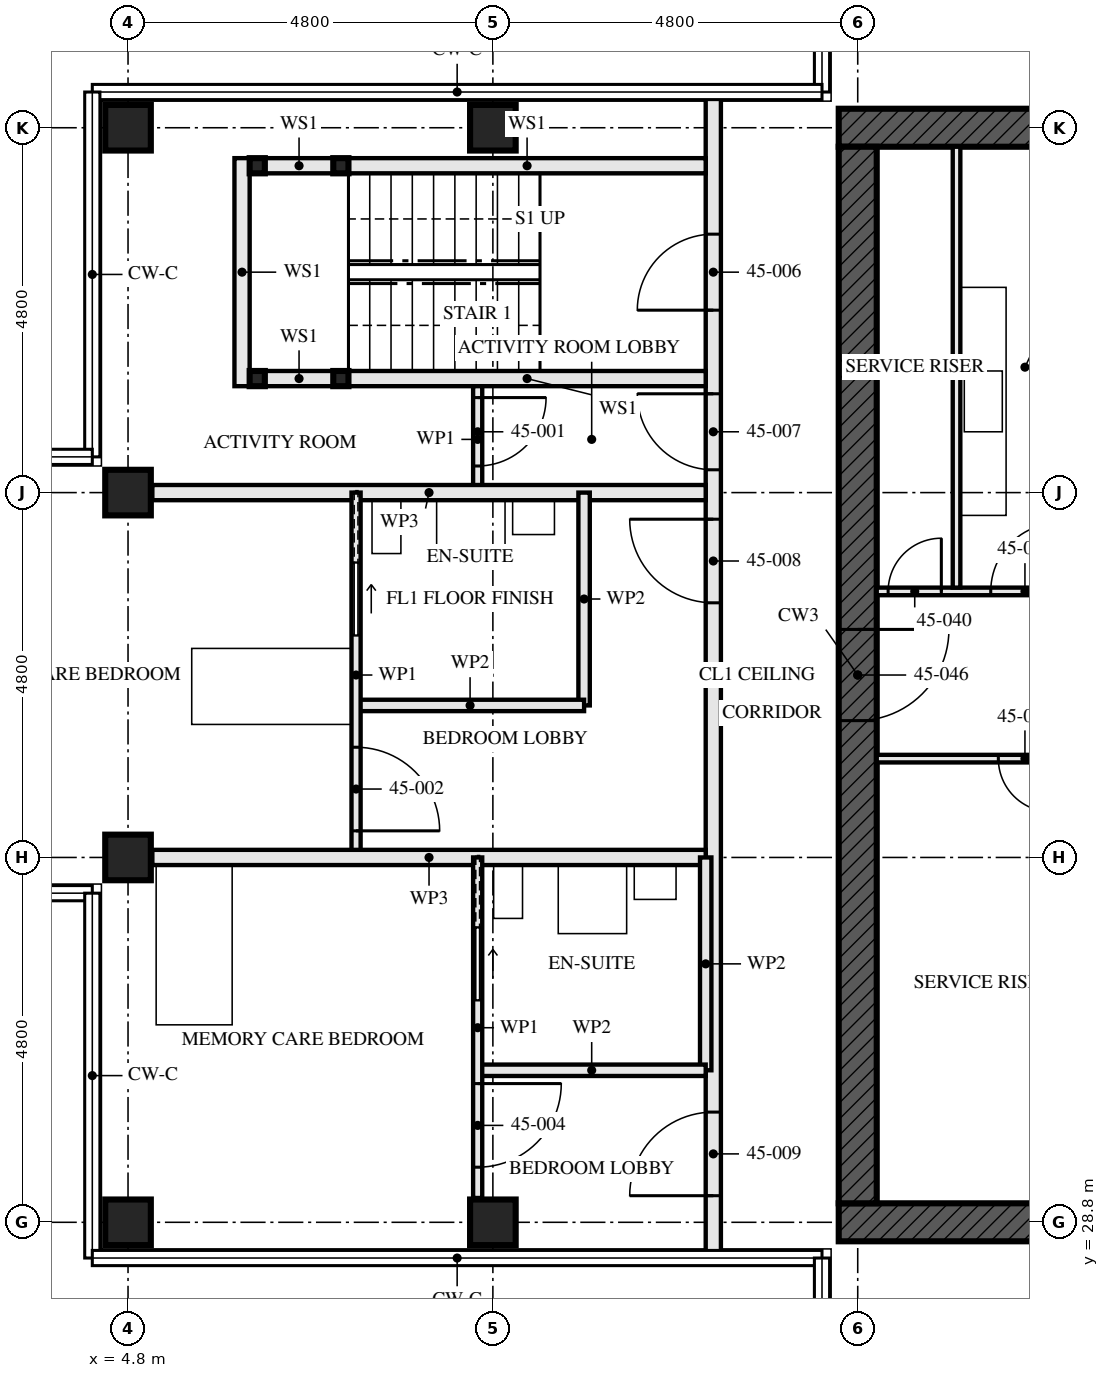
"""IFC4 building model, lengths in metres.
Left out: names, types, materials, properties, quantities, classifications, styles, units other than length and angle.
Written with IfcOpenShell. Run it as: python <this file> out.ifc"""

import sys

from ifc_helpers import new_model, si_unit, direction, frame, frame_2d, origin, origin_2d, place, context, subcontext, project, spatial, rectangle, hollow_rectangle, extrude, element, fill, save


model = new_model("IFC4")
c1 = context("Model", 3, precision=1e-05, world=origin(), true_north=direction((0.0, 1.0)))
c2 = subcontext(c1, "Body", "Model", "MODEL_VIEW")
j1 = project(units=[si_unit("LENGTHUNIT", "METRE"), si_unit("PLANEANGLEUNIT", "RADIAN")], contexts=[c1])
p1 = place(None, origin())
s1 = spatial("IfcSite", under=j1, at=p1, CompositionType="ELEMENT")
p2 = place(p1, origin())
s2 = spatial("IfcBuilding", under=s1, at=p2, CompositionType="ELEMENT")
p3 = place(p2, frame((0.0, 0.0, 165.5)))
s3 = spatial("IfcBuildingStorey", under=s2, at=p3, CompositionType="ELEMENT", Elevation=165.5)
for number, where, z_axis, x_axis in (
    (1, (4.8, 28.8, 0.0), (0.0, 0.0, 1.0), (0.0, 1.0, 0.0)),
    (2, (4.8, 33.6, 0.0), (0.0, 0.0, 1.0), (0.0, 1.0, 0.0)),
    (3, (4.8, 38.4, 0.0), (0.0, 0.0, 1.0), (0.0, 1.0, 0.0)),
    (4, (4.8, 43.2, 0.0), (0.0, 0.0, 1.0), (0.0, 1.0, 0.0)),
):
    element("IfcColumn", number, at=place(p3, frame(where, z_axis=z_axis, x_axis=x_axis)), inside=s3, PredefinedType="COLUMN", context=c2, shape_type="SweptSolid", body=[
        extrude(hollow_rectangle(XDim=0.6, YDim=0.6, WallThickness=0.06, at=origin_2d()), origin(), (0.0, 0.0, 1.0), 3.5),
    ])
for number, where, z_axis, x_axis in (
    (5, (9.6, 28.8, 0.0), (0.0, 0.0, 1.0), (0.0, 1.0, 0.0)),
    (6, (9.6, 43.2, 0.0), (0.0, 0.0, 1.0), (0.0, 1.0, 0.0)),
):
    element("IfcColumn", number, at=place(p3, frame(where, z_axis=z_axis, x_axis=x_axis)), inside=s3, PredefinedType="COLUMN", context=c2, shape_type="SweptSolid", body=[
        extrude(hollow_rectangle(XDim=0.6, YDim=0.6, WallThickness=0.08, at=origin_2d()), origin(), (0.0, 0.0, 1.0), 3.5),
    ])
p4 = place(p3, frame((14.15, 28.8, -0.17), z_axis=(0.0, 0.0, 1.0), x_axis=(1.0, 0.0, 0.0)))
e7 = element("IfcWall", 7, at=p4, inside=s3, PredefinedType="SHEAR", context=c2, shape_type="SweptSolid", body=[
    extrude(rectangle(XDim=14.9, YDim=0.5, at=frame_2d((7.45, 0.0))), origin(), (0.0, 0.0, 1.0), 3.5),
])
p5 = place(p4, frame((6.85, 0.0, 0.17)))
e8 = element("IfcOpeningElement", 8, at=p5, cuts=e7, PredefinedType="OPENING", context=c2, shape_type="SweptSolid", body=[
    extrude(rectangle(XDim=1.2, YDim=2.1, at=frame_2d((0.6, 1.05))), frame((0.0, 0.26, 0.0), z_axis=(0.0, -1.0, 0.0), x_axis=(1.0, 0.0, 0.0)), (0.0, 0.0, 1.0), 0.521),
])
p6 = place(p3, frame((29.05, 43.2, -0.17), z_axis=(0.0, 0.0, 1.0), x_axis=(-1.0, 0.0, 0.0)))
e9 = element("IfcWall", 9, at=p6, inside=s3, PredefinedType="SHEAR", context=c2, shape_type="SweptSolid", body=[
    extrude(rectangle(XDim=14.9, YDim=0.5, at=frame_2d((7.45, 0.0))), origin(), (0.0, 0.0, 1.0), 3.5),
])
p7 = place(p6, frame((6.85, 0.0, 0.17)))
e10 = element("IfcOpeningElement", 10, at=p7, cuts=e9, PredefinedType="OPENING", context=c2, shape_type="SweptSolid", body=[
    extrude(rectangle(XDim=1.2, YDim=2.1, at=frame_2d((0.6, 1.05))), frame((0.0, 0.26, 0.0), z_axis=(0.0, -1.0, 0.0), x_axis=(1.0, 0.0, 0.0)), (0.0, 0.0, 1.0), 0.521),
])
p8 = place(p3, frame((14.4, 42.95, -0.17), z_axis=(0.0, 0.0, 1.0), x_axis=(0.0, -1.0, 0.0)))
e11 = element("IfcWall", 11, at=p8, inside=s3, PredefinedType="SHEAR", context=c2, shape_type="SweptSolid", body=[
    extrude(rectangle(XDim=13.9, YDim=0.5, at=frame_2d((6.95, 0.0))), origin(), (0.0, 0.0, 1.0), 3.5),
])
p9 = place(p8, frame((6.35, 0.0, 0.17)))
e12 = element("IfcOpeningElement", 12, at=p9, cuts=e11, PredefinedType="OPENING", context=c2, shape_type="SweptSolid", body=[
    extrude(rectangle(XDim=1.2, YDim=2.1, at=frame_2d((0.6, 1.05))), frame((0.0, 0.26, 0.0), z_axis=(0.0, -1.0, 0.0), x_axis=(1.0, 0.0, 0.0)), (0.0, 0.0, 1.0), 0.521),
])
for number, where, z_axis, x_axis in (
    (13, (6.5, 42.7, 0.0), (0.0, 0.0, 1.0), (1.0, 0.0, 0.0)),
    (14, (6.5, 39.9, 0.0), (0.0, 0.0, 1.0), (1.0, 0.0, 0.0)),
    (15, (7.6, 42.7, 0.0), (0.0, 0.0, 1.0), (1.0, 0.0, 0.0)),
    (16, (7.6, 39.9, 0.0), (0.0, 0.0, 1.0), (1.0, 0.0, 0.0)),
):
    element("IfcColumn", number, at=place(p3, frame(where, z_axis=z_axis, x_axis=x_axis)), inside=s3, PredefinedType="COLUMN", context=c2, shape_type="SweptSolid", body=[
        extrude(hollow_rectangle(XDim=0.2, YDim=0.2, WallThickness=0.008, at=origin_2d()), origin(), (0.0, 0.0, 1.0), 3.33),
    ])
p10 = place(p3, frame((6.6, 42.7, 0.0), z_axis=(0.0, 0.0, 1.0), x_axis=(1.0, 0.0, 0.0)))
e17 = element("IfcWall", 17, at=p10, inside=s3, PredefinedType="SOLIDWALL", context=c2, shape_type="SweptSolid", body=[
    extrude(rectangle(XDim=0.9, YDim=0.2, at=frame_2d((0.45, 0.0))), origin(), (0.0, 0.0, 1.0), 2.99),
])
p11 = place(p3, frame((7.7, 42.7, 0.0), z_axis=(0.0, 0.0, 1.0), x_axis=(1.0, 0.0, 0.0)))
e18 = element("IfcWall", 18, at=p11, inside=s3, PredefinedType="SOLIDWALL", context=c2, shape_type="SweptSolid", body=[
    extrude(rectangle(XDim=4.7, YDim=0.2, at=frame_2d((2.35, 0.0))), origin(), (0.0, 0.0, 1.0), 2.99),
])
p12 = place(p3, frame((6.6, 39.9, 0.0), z_axis=(0.0, 0.0, 1.0), x_axis=(1.0, 0.0, 0.0)))
e19 = element("IfcWall", 19, at=p12, inside=s3, PredefinedType="SOLIDWALL", context=c2, shape_type="SweptSolid", body=[
    extrude(rectangle(XDim=0.9, YDim=0.2, at=frame_2d((0.45, 0.0))), origin(), (0.0, 0.0, 1.0), 2.99),
])
p13 = place(p3, frame((7.7, 39.9, 0.0), z_axis=(0.0, 0.0, 1.0), x_axis=(1.0, 0.0, 0.0)))
e20 = element("IfcWall", 20, at=p13, inside=s3, PredefinedType="SOLIDWALL", context=c2, shape_type="SweptSolid", body=[
    extrude(rectangle(XDim=4.7, YDim=0.2, at=frame_2d((2.35, 0.0))), origin(), (0.0, 0.0, 1.0), 2.99),
])
p14 = place(p3, frame((6.3, 42.8, 0.0), z_axis=(0.0, 0.0, 1.0), x_axis=(0.0, -1.0, 0.0)))
e21 = element("IfcWall", 21, at=p14, inside=s3, PredefinedType="SOLIDWALL", context=c2, shape_type="SweptSolid", body=[
    extrude(rectangle(XDim=3.0, YDim=0.2, at=frame_2d((1.5, 0.0))), origin(), (0.0, 0.0, 1.0), 3.33),
])
p15 = place(p3, frame((9.4, 39.8, 0.0), z_axis=(0.0, 0.0, 1.0), x_axis=(0.0, -1.0, 0.0)))
e22 = element("IfcWall", 22, at=p15, inside=s3, PredefinedType="PARTITIONING", context=c2, shape_type="SweptSolid", body=[
    extrude(rectangle(XDim=1.4, YDim=0.12, at=frame_2d((0.7, 0.0))), origin(), (0.0, 0.0, 1.0), 3.33),
])
p16 = place(p15, frame((0.15, 0.0, 0.0)))
e23 = element("IfcOpeningElement", 23, at=p16, cuts=e22, PredefinedType="OPENING", context=c2, shape_type="SweptSolid", body=[
    extrude(rectangle(XDim=0.9, YDim=2.1, at=frame_2d((0.45, 1.05))), frame((0.0, 0.071, 0.0), z_axis=(0.0, -1.0, 0.0), x_axis=(1.0, 0.0, 0.0)), (0.0, 0.0, 1.0), 0.141),
])
p17 = place(p3, frame((5.12, 38.4, 0.0), z_axis=(0.0, 0.0, 1.0), x_axis=(1.0, 0.0, 0.0)))
e24 = element("IfcWall", 24, at=p17, inside=s3, PredefinedType="PARTITIONING", context=c2, shape_type="SweptSolid", body=[
    extrude(rectangle(XDim=7.28, YDim=0.2, at=frame_2d((3.64, 0.0))), origin(), (0.0, 0.0, 1.0), 2.55),
])
p18 = place(p3, frame((7.8, 35.6, 0.0), z_axis=(0.0, 0.0, 1.0), x_axis=(1.0, 0.0, 0.0)))
e25 = element("IfcWall", 25, at=p18, inside=s3, PredefinedType="PARTITIONING", context=c2, shape_type="SweptSolid", body=[
    extrude(rectangle(XDim=3.0, YDim=0.15, at=frame_2d((1.5, 0.0))), origin(), (0.0, 0.0, 1.0), 3.33),
])
p19 = place(p3, frame((10.8, 38.4, 0.0), z_axis=(0.0, 0.0, 1.0), x_axis=(0.0, -1.0, 0.0)))
e26 = element("IfcWall", 26, at=p19, inside=s3, PredefinedType="PARTITIONING", context=c2, shape_type="SweptSolid", body=[
    extrude(rectangle(XDim=2.8, YDim=0.15, at=frame_2d((1.4, 0.0))), origin(), (0.0, 0.0, 1.0), 3.33),
])
p20 = place(p3, frame((7.8, 38.4, 0.0), z_axis=(0.0, 0.0, 1.0), x_axis=(0.0, -1.0, 0.0)))
e27 = element("IfcWall", 27, at=p20, inside=s3, PredefinedType="PARTITIONING", context=c2, shape_type="SweptSolid", body=[
    extrude(rectangle(XDim=4.8, YDim=0.12, at=frame_2d((2.4, 0.0))), origin(), (0.0, 0.0, 1.0), 3.33),
])
p21 = place(p20, frame((3.35, 0.0, 0.0)))
e28 = element("IfcOpeningElement", 28, at=p21, cuts=e27, PredefinedType="OPENING", context=c2, shape_type="SweptSolid", body=[
    extrude(rectangle(XDim=1.1, YDim=2.1, at=frame_2d((0.55, 1.05))), frame((0.0, 0.071, 0.0), z_axis=(0.0, -1.0, 0.0), x_axis=(1.0, 0.0, 0.0)), (0.0, 0.0, 1.0), 0.141),
])
p22 = place(p20, frame((0.925, 0.0, 0.0)))
e29 = element("IfcOpeningElement", 29, at=p22, cuts=e27, PredefinedType="OPENING", context=c2, shape_type="SweptSolid", body=[
    extrude(rectangle(XDim=0.95, YDim=2.1, at=frame_2d((0.475, 1.05))), frame((0.0, 0.071, 0.0), z_axis=(0.0, -1.0, 0.0), x_axis=(1.0, 0.0, 0.0)), (0.0, 0.0, 1.0), 0.141),
])
p23 = place(p3, frame((5.12, 33.6, 0.0), z_axis=(0.0, 0.0, 1.0), x_axis=(1.0, 0.0, 0.0)))
e30 = element("IfcWall", 30, at=p23, inside=s3, PredefinedType="PARTITIONING", context=c2, shape_type="SweptSolid", body=[
    extrude(rectangle(XDim=7.28, YDim=0.2, at=frame_2d((3.64, 0.0))), origin(), (0.0, 0.0, 1.0), 2.55),
])
p24 = place(p3, frame((9.4, 30.8, 0.0), z_axis=(0.0, 0.0, 1.0), x_axis=(1.0, 0.0, 0.0)))
e31 = element("IfcWall", 31, at=p24, inside=s3, PredefinedType="PARTITIONING", context=c2, shape_type="SweptSolid", body=[
    extrude(rectangle(XDim=3.0, YDim=0.15, at=frame_2d((1.5, 0.0))), origin(), (0.0, 0.0, 1.0), 3.33),
])
p25 = place(p3, frame((12.4, 33.6, 0.0), z_axis=(0.0, 0.0, 1.0), x_axis=(0.0, -1.0, 0.0)))
e32 = element("IfcWall", 32, at=p25, inside=s3, PredefinedType="PARTITIONING", context=c2, shape_type="SweptSolid", body=[
    extrude(rectangle(XDim=2.8, YDim=0.15, at=frame_2d((1.4, 0.0))), origin(), (0.0, 0.0, 1.0), 3.33),
])
p26 = place(p3, frame((9.4, 33.6, 0.0), z_axis=(0.0, 0.0, 1.0), x_axis=(0.0, -1.0, 0.0)))
e33 = element("IfcWall", 33, at=p26, inside=s3, PredefinedType="PARTITIONING", context=c2, shape_type="SweptSolid", body=[
    extrude(rectangle(XDim=4.48, YDim=0.12, at=frame_2d((2.24, 0.0))), origin(), (0.0, 0.0, 1.0), 3.33),
])
p27 = place(p26, frame((2.975, 0.0, 0.0)))
e34 = element("IfcOpeningElement", 34, at=p27, cuts=e33, PredefinedType="OPENING", context=c2, shape_type="SweptSolid", body=[
    extrude(rectangle(XDim=1.1, YDim=2.1, at=frame_2d((0.55, 1.05))), frame((0.0, 0.071, 0.0), z_axis=(0.0, -1.0, 0.0), x_axis=(1.0, 0.0, 0.0)), (0.0, 0.0, 1.0), 0.141),
])
p28 = place(p26, frame((0.925, 0.0, 0.0)))
e35 = element("IfcOpeningElement", 35, at=p28, cuts=e33, PredefinedType="OPENING", context=c2, shape_type="SweptSolid", body=[
    extrude(rectangle(XDim=0.95, YDim=2.1, at=frame_2d((0.475, 1.05))), frame((0.0, 0.071, 0.0), z_axis=(0.0, -1.0, 0.0), x_axis=(1.0, 0.0, 0.0)), (0.0, 0.0, 1.0), 0.141),
])
p29 = place(p3, frame((12.5, 43.65, 0.0), z_axis=(0.0, 0.0, 1.0), x_axis=(0.0, -1.0, 0.0)))
e36 = element("IfcWall", 36, at=p29, inside=s3, PredefinedType="PARTITIONING", context=c2, shape_type="SweptSolid", body=[
    extrude(rectangle(XDim=15.3, YDim=0.2, at=frame_2d((7.65, 0.0))), origin(), (0.0, 0.0, 1.0), 2.32),
])
p30 = place(p29, frame((1.85, 0.0, 0.0)))
e37 = element("IfcOpeningElement", 37, at=p30, cuts=e36, PredefinedType="OPENING", context=c2, shape_type="SweptSolid", body=[
    extrude(rectangle(XDim=1.0, YDim=2.1, at=frame_2d((0.5, 1.05))), frame((0.0, 0.111, 0.0), z_axis=(0.0, -1.0, 0.0), x_axis=(1.0, 0.0, 0.0)), (0.0, 0.0, 1.0), 0.221),
])
p31 = place(p29, frame((3.95, 0.0, 0.0)))
e38 = element("IfcOpeningElement", 38, at=p31, cuts=e36, PredefinedType="OPENING", context=c2, shape_type="SweptSolid", body=[
    extrude(rectangle(XDim=1.0, YDim=2.1, at=frame_2d((0.5, 1.05))), frame((0.0, 0.111, 0.0), z_axis=(0.0, -1.0, 0.0), x_axis=(1.0, 0.0, 0.0)), (0.0, 0.0, 1.0), 0.221),
])
p32 = place(p29, frame((5.6, 0.0, 0.0)))
e39 = element("IfcOpeningElement", 39, at=p32, cuts=e36, PredefinedType="OPENING", context=c2, shape_type="SweptSolid", body=[
    extrude(rectangle(XDim=1.1, YDim=2.1, at=frame_2d((0.55, 1.05))), frame((0.0, 0.111, 0.0), z_axis=(0.0, -1.0, 0.0), x_axis=(1.0, 0.0, 0.0)), (0.0, 0.0, 1.0), 0.221),
])
p33 = place(p29, frame((13.4, 0.0, 0.0)))
e40 = element("IfcOpeningElement", 40, at=p33, cuts=e36, PredefinedType="OPENING", context=c2, shape_type="SweptSolid", body=[
    extrude(rectangle(XDim=1.1, YDim=2.1, at=frame_2d((0.55, 1.05))), frame((0.0, 0.111, 0.0), z_axis=(0.0, -1.0, 0.0), x_axis=(1.0, 0.0, 0.0)), (0.0, 0.0, 1.0), 0.221),
])
p34 = place(p3, frame((15.7, 37.15, 0.0), z_axis=(0.0, 0.0, 1.0), x_axis=(0.0, 1.0, 0.0)))
e41 = element("IfcWall", 41, at=p34, inside=s3, PredefinedType="SOLIDWALL", context=c2, shape_type="SweptSolid", body=[
    extrude(rectangle(XDim=5.8, YDim=0.1, at=frame_2d((2.9, 0.0))), origin(), (0.0, 0.0, 1.0), 3.33),
])
p35 = place(p3, frame((14.65, 34.9, 0.0), z_axis=(0.0, 0.0, 1.0), x_axis=(1.0, 0.0, 0.0)))
e42 = element("IfcWall", 42, at=p35, inside=s3, PredefinedType="SOLIDWALL", context=c2, shape_type="SweptSolid", body=[
    extrude(rectangle(XDim=5.9, YDim=0.1, at=frame_2d((2.95, 0.0))), origin(), (0.0, 0.0, 1.0), 3.33),
])
p36 = place(p35, frame((1.6, 0.0, 0.0)))
e43 = element("IfcOpeningElement", 43, at=p36, cuts=e42, PredefinedType="OPENING", context=c2, shape_type="SweptSolid", body=[
    extrude(rectangle(XDim=0.7, YDim=2.1, at=frame_2d((0.35, 1.05))), frame((0.0, 0.061, 0.0), z_axis=(0.0, -1.0, 0.0), x_axis=(1.0, 0.0, 0.0)), (0.0, 0.0, 1.0), 0.121),
])
p37 = place(p3, frame((14.65, 37.1, 0.0), z_axis=(0.0, 0.0, 1.0), x_axis=(1.0, 0.0, 0.0)))
e44 = element("IfcWall", 44, at=p37, inside=s3, PredefinedType="SOLIDWALL", context=c2, shape_type="SweptSolid", body=[
    extrude(rectangle(XDim=5.9, YDim=0.1, at=frame_2d((2.95, 0.0))), origin(), (0.0, 0.0, 1.0), 3.33),
])
p38 = place(p37, frame((0.15, 0.0, 0.0)))
e45 = element("IfcOpeningElement", 45, at=p38, cuts=e44, PredefinedType="OPENING", context=c2, shape_type="SweptSolid", body=[
    extrude(rectangle(XDim=0.7, YDim=2.1, at=frame_2d((0.35, 1.05))), frame((0.0, 0.061, 0.0), z_axis=(0.0, -1.0, 0.0), x_axis=(1.0, 0.0, 0.0)), (0.0, 0.0, 1.0), 0.121),
])
p39 = place(p37, frame((1.5, 0.0, 0.0)))
e46 = element("IfcOpeningElement", 46, at=p39, cuts=e44, PredefinedType="OPENING", context=c2, shape_type="SweptSolid", body=[
    extrude(rectangle(XDim=0.9, YDim=2.1, at=frame_2d((0.45, 1.05))), frame((0.0, 0.061, 0.0), z_axis=(0.0, -1.0, 0.0), x_axis=(1.0, 0.0, 0.0)), (0.0, 0.0, 1.0), 0.121),
])
p40 = place(p16, origin())
e47 = element("IfcDoor", 47, at=p40, inside=s3, OperationType="SINGLE_SWING_RIGHT", PredefinedType="DOOR", context=c2, shape_type="SweptSolid", body=[
    extrude(rectangle(XDim=0.9, YDim=2.1, at=frame_2d((0.45, 1.05))), frame((0.0, 0.022, 0.0), z_axis=(0.0, -1.0, 0.0), x_axis=(1.0, 0.0, 0.0)), (0.0, 0.0, 1.0), 0.044),
])
fill(e23, e47)
p41 = place(p21, origin())
e48 = element("IfcDoor", 48, at=p41, inside=s3, OperationType="SINGLE_SWING_LEFT", PredefinedType="DOOR", context=c2, shape_type="SweptSolid", body=[
    extrude(rectangle(XDim=1.1, YDim=2.1, at=frame_2d((0.55, 1.05))), frame((0.0, 0.022, 0.0), z_axis=(0.0, -1.0, 0.0), x_axis=(1.0, 0.0, 0.0)), (0.0, 0.0, 1.0), 0.044),
])
fill(e28, e48)
p42 = place(p22, origin())
e49 = element("IfcDoor", 49, at=p42, inside=s3, OperationType="SLIDING_TO_RIGHT", PredefinedType="DOOR", context=c2, shape_type="SweptSolid", body=[
    extrude(rectangle(XDim=0.95, YDim=2.1, at=frame_2d((0.475, 1.05))), frame((0.0, 0.022, 0.0), z_axis=(0.0, -1.0, 0.0), x_axis=(1.0, 0.0, 0.0)), (0.0, 0.0, 1.0), 0.044),
])
fill(e29, e49)
p43 = place(p27, origin())
e50 = element("IfcDoor", 50, at=p43, inside=s3, OperationType="SINGLE_SWING_RIGHT", PredefinedType="DOOR", context=c2, shape_type="SweptSolid", body=[
    extrude(rectangle(XDim=1.1, YDim=2.1, at=frame_2d((0.55, 1.05))), frame((0.0, 0.022, 0.0), z_axis=(0.0, -1.0, 0.0), x_axis=(1.0, 0.0, 0.0)), (0.0, 0.0, 1.0), 0.044),
])
fill(e34, e50)
p44 = place(p28, origin())
e51 = element("IfcDoor", 51, at=p44, inside=s3, OperationType="SLIDING_TO_RIGHT", PredefinedType="DOOR", context=c2, shape_type="SweptSolid", body=[
    extrude(rectangle(XDim=0.95, YDim=2.1, at=frame_2d((0.475, 1.05))), frame((0.0, 0.022, 0.0), z_axis=(0.0, -1.0, 0.0), x_axis=(1.0, 0.0, 0.0)), (0.0, 0.0, 1.0), 0.044),
])
fill(e35, e51)
p45 = place(p30, frame((1.0, 0.0, 0.0), z_axis=(0.0, 0.0, 1.0), x_axis=(-1.0, 0.0, 0.0)))
e52 = element("IfcDoor", 52, at=p45, inside=s3, OperationType="SINGLE_SWING_RIGHT", PredefinedType="DOOR", context=c2, shape_type="SweptSolid", body=[
    extrude(rectangle(XDim=1.0, YDim=2.1, at=frame_2d((0.5, 1.05))), frame((0.0, 0.032, 0.0), z_axis=(0.0, -1.0, 0.0), x_axis=(1.0, 0.0, 0.0)), (0.0, 0.0, 1.0), 0.064),
])
fill(e37, e52)
p46 = place(p31, frame((1.0, 0.0, 0.0), z_axis=(0.0, 0.0, 1.0), x_axis=(-1.0, 0.0, 0.0)))
e53 = element("IfcDoor", 53, at=p46, inside=s3, OperationType="SINGLE_SWING_LEFT", PredefinedType="DOOR", context=c2, shape_type="SweptSolid", body=[
    extrude(rectangle(XDim=1.0, YDim=2.1, at=frame_2d((0.5, 1.05))), frame((0.0, 0.027, 0.0), z_axis=(0.0, -1.0, 0.0), x_axis=(1.0, 0.0, 0.0)), (0.0, 0.0, 1.0), 0.054),
])
fill(e38, e53)
p47 = place(p32, frame((1.1, 0.0, 0.0), z_axis=(0.0, 0.0, 1.0), x_axis=(-1.0, 0.0, 0.0)))
e54 = element("IfcDoor", 54, at=p47, inside=s3, OperationType="SINGLE_SWING_LEFT", PredefinedType="DOOR", context=c2, shape_type="SweptSolid", body=[
    extrude(rectangle(XDim=1.1, YDim=2.1, at=frame_2d((0.55, 1.05))), frame((0.0, 0.027, 0.0), z_axis=(0.0, -1.0, 0.0), x_axis=(1.0, 0.0, 0.0)), (0.0, 0.0, 1.0), 0.054),
])
fill(e39, e54)
p48 = place(p33, frame((1.1, 0.0, 0.0), z_axis=(0.0, 0.0, 1.0), x_axis=(-1.0, 0.0, 0.0)))
e55 = element("IfcDoor", 55, at=p48, inside=s3, OperationType="SINGLE_SWING_RIGHT", PredefinedType="DOOR", context=c2, shape_type="SweptSolid", body=[
    extrude(rectangle(XDim=1.1, YDim=2.1, at=frame_2d((0.55, 1.05))), frame((0.0, 0.027, 0.0), z_axis=(0.0, -1.0, 0.0), x_axis=(1.0, 0.0, 0.0)), (0.0, 0.0, 1.0), 0.054),
])
fill(e40, e55)
p49 = place(p36, frame((0.7, 0.0, 0.0), z_axis=(0.0, 0.0, 1.0), x_axis=(-1.0, 0.0, 0.0)))
e56 = element("IfcDoor", 56, at=p49, inside=s3, OperationType="SINGLE_SWING_RIGHT", PredefinedType="DOOR", context=c2, shape_type="SweptSolid", body=[
    extrude(rectangle(XDim=0.7, YDim=2.1, at=frame_2d((0.35, 1.05))), frame((0.0, 0.027, 0.0), z_axis=(0.0, -1.0, 0.0), x_axis=(1.0, 0.0, 0.0)), (0.0, 0.0, 1.0), 0.054),
])
fill(e43, e56)
p50 = place(p38, origin())
e57 = element("IfcDoor", 57, at=p50, inside=s3, OperationType="SINGLE_SWING_LEFT", PredefinedType="DOOR", context=c2, shape_type="SweptSolid", body=[
    extrude(rectangle(XDim=0.7, YDim=2.1, at=frame_2d((0.35, 1.05))), frame((0.0, 0.027, 0.0), z_axis=(0.0, -1.0, 0.0), x_axis=(1.0, 0.0, 0.0)), (0.0, 0.0, 1.0), 0.054),
])
fill(e45, e57)
p51 = place(p39, origin())
e58 = element("IfcDoor", 58, at=p51, inside=s3, OperationType="SINGLE_SWING_LEFT", PredefinedType="DOOR", context=c2, shape_type="SweptSolid", body=[
    extrude(rectangle(XDim=0.9, YDim=2.1, at=frame_2d((0.45, 1.05))), frame((0.0, 0.027, 0.0), z_axis=(0.0, -1.0, 0.0), x_axis=(1.0, 0.0, 0.0)), (0.0, 0.0, 1.0), 0.054),
])
fill(e46, e58)
p52 = place(p9, origin())
e59 = element("IfcDoor", 59, at=p52, inside=s3, OperationType="SINGLE_SWING_LEFT", PredefinedType="DOOR", context=c2, shape_type="SweptSolid", body=[
    extrude(rectangle(XDim=1.2, YDim=2.1, at=frame_2d((0.6, 1.05))), frame((0.0, 0.027, 0.0), z_axis=(0.0, -1.0, 0.0), x_axis=(1.0, 0.0, 0.0)), (0.0, 0.0, 1.0), 0.054),
])
fill(e12, e59)
save(model, sys.argv[1])
